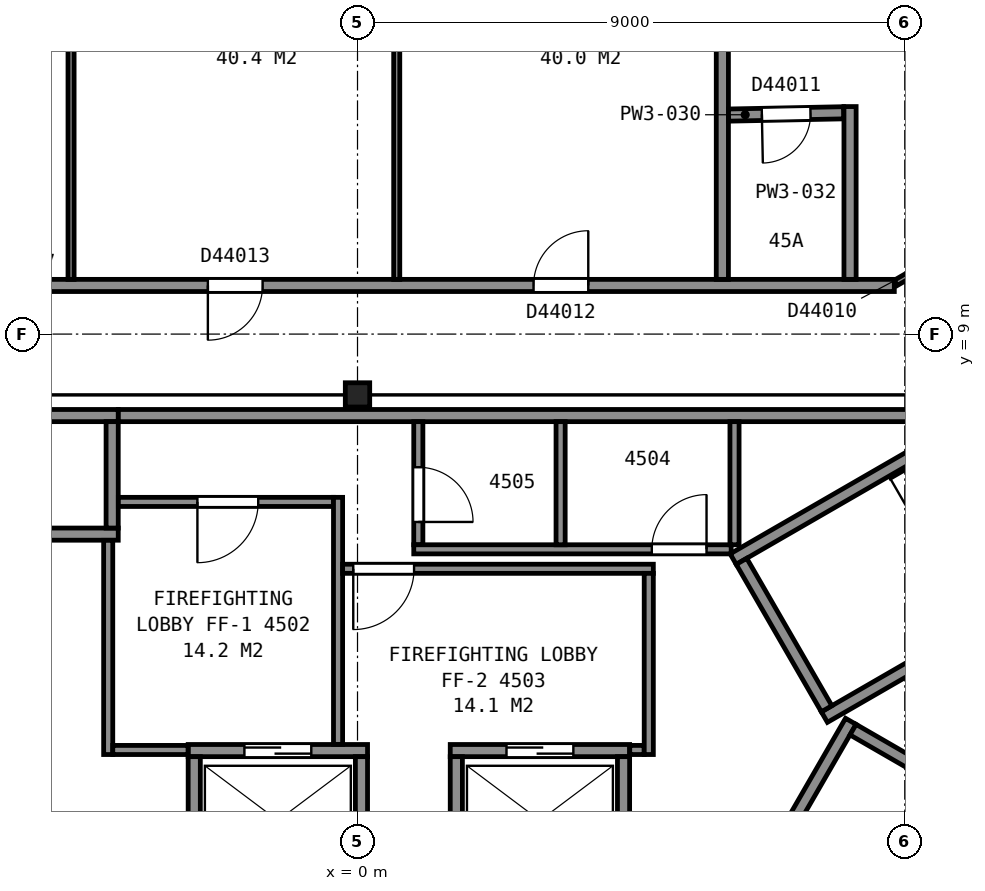
"""IFC4 building model, lengths in metres.
Left out: names, types, materials, properties, quantities, classifications, styles, units other than length and angle.
Written with IfcOpenShell. Run it as: python <this file> out.ifc"""

import sys

from ifc_helpers import new_model, si_unit, direction, frame, frame_2d, origin, origin_2d, place, context, subcontext, project, spatial, rectangle, i_section, extrude, element, fill, save


model = new_model("IFC4")
c1 = context("Model", 3, precision=1e-05, world=origin(), true_north=direction((0.0, 1.0)))
c2 = subcontext(c1, "Body", "Model", "MODEL_VIEW")
j1 = project(units=[si_unit("LENGTHUNIT", "METRE"), si_unit("PLANEANGLEUNIT", "RADIAN")], contexts=[c1])
p1 = place(None, origin())
s1 = spatial("IfcSite", under=j1, at=p1, CompositionType="ELEMENT")
p2 = place(p1, origin())
s2 = spatial("IfcBuilding", under=s1, at=p2, CompositionType="ELEMENT")
p3 = place(p2, frame((0.0, 0.0, 182.1)))
s3 = spatial("IfcBuildingStorey", under=s2, at=p3, CompositionType="ELEMENT", Elevation=182.1)
p4 = place(p3, frame((0.0, 8.0, 0.0), z_axis=(0.0, 0.0, 1.0), x_axis=(1.0, 0.0, 0.0)))
e1 = element("IfcColumn", 1, at=p4, inside=s3, PredefinedType="COLUMN", context=c2, shape_type="SweptSolid", body=[
    extrude(i_section(OverallWidth=0.401, OverallDepth=0.399, WebThickness=0.025, FlangeThickness=0.04, FilletRadius=0.015, at=origin_2d()), origin(), (0.0, 0.0, 1.0), 3.7),
])
for number, where, z_axis, x_axis in (
    (2, (6.178, 5.299, 0.0), (0.0, 0.0, 1.0), (0.866, 0.5, 0.0)),
    (3, (7.678, 2.701, 0.0), (0.0, 0.0, 1.0), (0.866, 0.5, 0.0)),
):
    element("IfcWall", number, at=place(p3, frame(where, z_axis=z_axis, x_axis=x_axis)), inside=s3, PredefinedType="PARTITIONING", context=c2, shape_type="SweptSolid", body=[
        extrude(rectangle(XDim=9.6, YDim=0.2, at=frame_2d((4.8, 0.0))), origin(), (0.0, 0.0, 1.0), 3.45),
    ])
p5 = place(p3, frame((7.715, 2.838, 0.0), z_axis=(0.0, 0.0, 1.0), x_axis=(-0.500049511043, 0.865996816683, 0.0)))
e4 = element("IfcWall", 4, at=p5, inside=s3, PredefinedType="PARTITIONING", context=c2, shape_type="SweptSolid", body=[
    extrude(rectangle(XDim=2.8, YDim=0.2, at=frame_2d((1.4, 0.0))), origin(), (0.0, 0.0, 1.0), 3.45),
])
p6 = place(p3, frame((-2.785, 2.15, 0.0), z_axis=(0.0, 0.0, 1.0), x_axis=(1.0, 0.0, 0.0)))
e5 = element("IfcWall", 5, at=p6, inside=s3, PredefinedType="PARTITIONING", context=c2, shape_type="SweptSolid", body=[
    extrude(rectangle(XDim=2.95, YDim=0.2, at=frame_2d((1.475, 0.0))), origin(), (0.0, 0.0, 1.0), 3.7),
])
p7 = place(p6, frame((0.925, 0.0, 0.0)))
e6 = element("IfcOpeningElement", 6, at=p7, cuts=e5, PredefinedType="OPENING", context=c2, shape_type="SweptSolid", body=[
    extrude(rectangle(XDim=1.1, YDim=2.1, at=frame_2d((0.55, 1.05))), frame((0.0, 0.11, 0.0), z_axis=(0.0, -1.0, 0.0), x_axis=(1.0, 0.0, 0.0)), (0.0, 0.0, 1.0), 0.22),
])
p8 = place(p3, frame((1.525, 2.15, 0.0), z_axis=(0.0, 0.0, 1.0), x_axis=(1.0, 0.0, 0.0)))
e7 = element("IfcWall", 7, at=p8, inside=s3, PredefinedType="PARTITIONING", context=c2, shape_type="SweptSolid", body=[
    extrude(rectangle(XDim=2.95, YDim=0.2, at=frame_2d((1.475, 0.0))), origin(), (0.0, 0.0, 1.0), 3.7),
])
p9 = place(p8, frame((0.925, 0.0, 0.0)))
e8 = element("IfcOpeningElement", 8, at=p9, cuts=e7, PredefinedType="OPENING", context=c2, shape_type="SweptSolid", body=[
    extrude(rectangle(XDim=1.1, YDim=2.1, at=frame_2d((0.55, 1.05))), frame((0.0, 0.11, 0.0), z_axis=(0.0, -1.0, 0.0), x_axis=(1.0, 0.0, 0.0)), (0.0, 0.0, 1.0), 0.22),
])
for number, where, z_axis, x_axis in (
    (9, (-6.285, 5.71, 0.0), (0.0, 0.0, 1.0), (1.0, 0.0, 0.0)),
    (10, (-6.285, 7.66, 0.0), (0.0, 0.0, 1.0), (1.0, 0.0, 0.0)),
):
    element("IfcWall", number, at=place(p3, frame(where, z_axis=z_axis, x_axis=x_axis)), inside=s3, PredefinedType="PARTITIONING", context=c2, shape_type="SweptSolid", body=[
        extrude(rectangle(XDim=2.35, YDim=0.2, at=frame_2d((1.175, 0.0))), origin(), (0.0, 0.0, 1.0), 3.7),
    ])
p10 = place(p3, frame((7.351, -2.587, 0.0), z_axis=(0.0, 0.0, 1.0), x_axis=(0.500002801628, 0.866023786258, 0.0)))
e11 = element("IfcWall", 11, at=p10, inside=s3, PredefinedType="PARTITIONING", context=c2, shape_type="SweptSolid", body=[
    extrude(rectangle(XDim=4.9, YDim=0.2, at=frame_2d((2.45, 0.0))), origin(), (0.0, 0.0, 1.0), 3.7),
])
p11 = place(p3, frame((5.663, -1.612, 0.0), z_axis=(0.0, 0.0, 1.0), x_axis=(0.49998122708, 0.866036242063, 0.0)))
e12 = element("IfcWall", 12, at=p11, inside=s3, PredefinedType="PARTITIONING", context=c2, shape_type="SweptSolid", body=[
    extrude(rectangle(XDim=4.9, YDim=0.2, at=frame_2d((2.45, 0.0))), origin(), (0.0, 0.0, 1.0), 3.7),
])
for number, where, z_axis, x_axis in (
    (13, (4.375, 0.1, 0.0), (0.0, 0.0, 1.0), (0.0, 1.0, 0.0)),
    (14, (1.625, 0.1, 0.0), (0.0, 0.0, 1.0), (0.0, 1.0, 0.0)),
    (15, (0.065, 0.1, 0.0), (0.0, 0.0, 1.0), (0.0, 1.0, 0.0)),
    (16, (-2.685, 0.1, 0.0), (0.0, 0.0, 1.0), (0.0, 1.0, 0.0)),
):
    element("IfcWall", number, at=place(p3, frame(where, z_axis=z_axis, x_axis=x_axis)), inside=s3, PredefinedType="PARTITIONING", context=c2, shape_type="SweptSolid", body=[
        extrude(rectangle(XDim=1.95, YDim=0.2, at=frame_2d((0.975, 0.0))), origin(), (0.0, 0.0, 1.0), 3.7),
    ])
p12 = place(p3, frame((-4.035, 5.81, 0.0), z_axis=(0.0, 0.0, 1.0), x_axis=(0.0, 1.0, 0.0)))
e17 = element("IfcWall", 17, at=p12, inside=s3, PredefinedType="PARTITIONING", context=c2, shape_type="SweptSolid", body=[
    extrude(rectangle(XDim=1.75, YDim=0.2, at=frame_2d((0.875, 0.0))), origin(), (0.0, 0.0, 1.0), 3.7),
])
p13 = place(p3, frame((9.665, 1.62, 0.0), z_axis=(0.0, 0.0, 1.0), x_axis=(-0.866002029911, 0.500040482552, 0.0)))
e18 = element("IfcWall", 18, at=p13, inside=s3, PredefinedType="PARTITIONING", context=c2, shape_type="SweptSolid", body=[
    extrude(rectangle(XDim=1.75, YDim=0.2, at=frame_2d((0.875, 0.0))), origin(), (0.0, 0.0, 1.0), 3.7),
])
p14 = place(p3, frame((-4.1, 2.085, 0.0), z_axis=(0.0, 0.0, 1.0), x_axis=(0.0, 1.0, 0.0)))
e19 = element("IfcWall", 19, at=p14, inside=s3, PredefinedType="PARTITIONING", context=c2, shape_type="SweptSolid", body=[
    extrude(rectangle(XDim=3.523, YDim=0.15, at=frame_2d((1.761, 0.0))), origin(), (0.0, 0.0, 1.0), 3.45),
])
p15 = place(p3, frame((-4.025, 2.16, 0.0), z_axis=(0.0, 0.0, 1.0), x_axis=(1.0, 0.0, 0.0)))
e20 = element("IfcWall", 20, at=p15, inside=s3, PredefinedType="PARTITIONING", context=c2, shape_type="SweptSolid", body=[
    extrude(rectangle(XDim=1.238, YDim=0.15, at=frame_2d((0.619, 0.0))), origin(), (0.0, 0.0, 1.0), 3.45),
])
p16 = place(p3, frame((-3.933, 6.24, 0.0), z_axis=(0.0, 0.0, 1.0), x_axis=(1.0, 0.0, 0.0)))
e21 = element("IfcWall", 21, at=p16, inside=s3, PredefinedType="PARTITIONING", context=c2, shape_type="SweptSolid", body=[
    extrude(rectangle(XDim=3.538, YDim=0.15, at=frame_2d((1.769, 0.0))), origin(), (0.0, 0.0, 1.0), 3.45),
])
p17 = place(p16, frame((1.3, 0.0, 0.0)))
e22 = element("IfcOpeningElement", 22, at=p17, cuts=e21, PredefinedType="OPENING", context=c2, shape_type="SweptSolid", body=[
    extrude(rectangle(XDim=1.0, YDim=2.1, at=frame_2d((0.5, 1.05))), frame((0.0, 0.085, 0.0), z_axis=(0.0, -1.0, 0.0), x_axis=(1.0, 0.0, 0.0)), (0.0, 0.0, 1.0), 0.17),
])
p18 = place(p3, frame((-3.933, 7.66, 0.0), z_axis=(0.0, 0.0, 1.0), x_axis=(1.0, 0.0, 0.0)))
e23 = element("IfcWall", 23, at=p18, inside=s3, PredefinedType="PARTITIONING", context=c2, shape_type="SweptSolid", body=[
    extrude(rectangle(XDim=13.841, YDim=0.2, at=frame_2d((6.92, 0.0))), origin(), (0.0, 0.0, 1.0), 3.45),
])
p19 = place(p3, frame((-0.32, 2.252, 0.0), z_axis=(0.0, 0.0, 1.0), x_axis=(0.0, 1.0, 0.0)))
e24 = element("IfcWall", 24, at=p19, inside=s3, PredefinedType="PARTITIONING", context=c2, shape_type="SweptSolid", body=[
    extrude(rectangle(XDim=4.063, YDim=0.15, at=frame_2d((2.031, 0.0))), origin(), (0.0, 0.0, 1.0), 3.45),
])
p20 = place(p3, frame((-0.245, 5.14, 0.0), z_axis=(0.0, 0.0, 1.0), x_axis=(1.0, 0.0, 0.0)))
e25 = element("IfcWall", 25, at=p20, inside=s3, PredefinedType="PARTITIONING", context=c2, shape_type="SweptSolid", body=[
    extrude(rectangle(XDim=5.11, YDim=0.15, at=frame_2d((2.555, 0.0))), origin(), (0.0, 0.0, 1.0), 3.45),
])
p21 = place(p20, frame((0.175, 0.0, 0.0)))
e26 = element("IfcOpeningElement", 26, at=p21, cuts=e25, PredefinedType="OPENING", context=c2, shape_type="SweptSolid", body=[
    extrude(rectangle(XDim=1.0, YDim=2.1, at=frame_2d((0.5, 1.05))), frame((0.0, 0.085, 0.0), z_axis=(0.0, -1.0, 0.0), x_axis=(1.0, 0.0, 0.0)), (0.0, 0.0, 1.0), 0.17),
])
p22 = place(p3, frame((1.0, 7.56, 0.0), z_axis=(0.0, 0.0, 1.0), x_axis=(0.0, -1.0, 0.0)))
e27 = element("IfcWall", 27, at=p22, inside=s3, PredefinedType="PARTITIONING", context=c2, shape_type="SweptSolid", body=[
    extrude(rectangle(XDim=2.025, YDim=0.15, at=frame_2d((1.013, 0.0))), origin(), (0.0, 0.0, 1.0), 3.45),
])
p23 = place(p22, frame((0.75, 0.0, 0.0)))
e28 = element("IfcOpeningElement", 28, at=p23, cuts=e27, PredefinedType="OPENING", context=c2, shape_type="SweptSolid", body=[
    extrude(rectangle(XDim=0.9, YDim=2.1, at=frame_2d((0.45, 1.05))), frame((0.0, 0.085, 0.0), z_axis=(0.0, -1.0, 0.0), x_axis=(1.0, 0.0, 0.0)), (0.0, 0.0, 1.0), 0.17),
])
p24 = place(p3, frame((0.925, 5.46, 0.0), z_axis=(0.0, 0.0, 1.0), x_axis=(1.0, 0.0, 0.0)))
e29 = element("IfcWall", 29, at=p24, inside=s3, PredefinedType="PARTITIONING", context=c2, shape_type="SweptSolid", body=[
    extrude(rectangle(XDim=5.22, YDim=0.15, at=frame_2d((2.61, 0.0))), origin(), (0.0, 0.0, 1.0), 3.45),
])
p25 = place(p24, frame((3.915, 0.0, 0.0)))
e30 = element("IfcOpeningElement", 30, at=p25, cuts=e29, PredefinedType="OPENING", context=c2, shape_type="SweptSolid", body=[
    extrude(rectangle(XDim=0.9, YDim=2.1, at=frame_2d((0.45, 1.05))), frame((0.0, 0.085, 0.0), z_axis=(0.0, -1.0, 0.0), x_axis=(1.0, 0.0, 0.0)), (0.0, 0.0, 1.0), 0.17),
])
p26 = place(p3, frame((3.34, 5.535, 0.0), z_axis=(0.0, 0.0, 1.0), x_axis=(0.0, 1.0, 0.0)))
e31 = element("IfcWall", 31, at=p26, inside=s3, PredefinedType="PARTITIONING", context=c2, shape_type="SweptSolid", body=[
    extrude(rectangle(XDim=2.025, YDim=0.15, at=frame_2d((1.013, 0.0))), origin(), (0.0, 0.0, 1.0), 3.45),
])
p27 = place(p3, frame((4.477, 2.16, 0.0), z_axis=(0.0, 0.0, 1.0), x_axis=(1.0, 0.0, 0.0)))
e32 = element("IfcWall", 32, at=p27, inside=s3, PredefinedType="PARTITIONING", context=c2, shape_type="SweptSolid", body=[
    extrude(rectangle(XDim=0.238, YDim=0.15, at=frame_2d((0.119, 0.0))), origin(), (0.0, 0.0, 1.0), 3.45),
])
p28 = place(p3, frame((4.79, 2.085, 0.0), z_axis=(0.0, 0.0, 1.0), x_axis=(0.0, 1.0, 0.0)))
e33 = element("IfcWall", 33, at=p28, inside=s3, PredefinedType="PARTITIONING", context=c2, shape_type="SweptSolid", body=[
    extrude(rectangle(XDim=2.98, YDim=0.15, at=frame_2d((1.49, 0.0))), origin(), (0.0, 0.0, 1.0), 3.45),
])
p29 = place(p3, frame((6.2, 5.535, 0.0), z_axis=(0.0, 0.0, 1.0), x_axis=(0.0, 1.0, 0.0)))
e34 = element("IfcWall", 34, at=p29, inside=s3, PredefinedType="PARTITIONING", context=c2, shape_type="SweptSolid", body=[
    extrude(rectangle(XDim=2.025, YDim=0.15, at=frame_2d((1.013, 0.0))), origin(), (0.0, 0.0, 1.0), 3.45),
])
p30 = place(p3, frame((-4.075, -12.545, 0.0), z_axis=(0.0, 0.0, 1.0), x_axis=(-0.499997769292, 0.86602669168, 0.0)))
e35 = element("IfcWall", 35, at=p30, inside=s3, PredefinedType="PARTITIONING", context=c2, shape_type="SweptSolid", body=[
    extrude(rectangle(XDim=17.706, YDim=0.2, at=frame_2d((8.853, 0.0))), origin(), (0.0, 0.0, 1.0), 2.713),
])
p31 = place(p30, frame((14.46, 0.0, 0.0)))
e36 = element("IfcOpeningElement", 36, at=p31, cuts=e35, PredefinedType="OPENING", context=c2, shape_type="SweptSolid", body=[
    extrude(rectangle(XDim=0.9, YDim=2.1, at=frame_2d((0.45, 1.05))), frame((0.0, 0.11, 0.0), z_axis=(0.0, -1.0, 0.0), x_axis=(1.0, 0.0, 0.0)), (0.0, 0.0, 1.0), 0.22),
])
p32 = place(p30, frame((10.896, 0.0, 0.0)))
e37 = element("IfcOpeningElement", 37, at=p32, cuts=e35, PredefinedType="OPENING", context=c2, shape_type="SweptSolid", body=[
    extrude(rectangle(XDim=0.9, YDim=2.1, at=frame_2d((0.45, 1.05))), frame((0.0, 0.11, 0.0), z_axis=(0.0, -1.0, 0.0), x_axis=(1.0, 0.0, 0.0)), (0.0, 0.0, 1.0), 0.22),
])
p33 = place(p30, frame((6.068, 0.0, 0.0)))
e38 = element("IfcOpeningElement", 38, at=p33, cuts=e35, PredefinedType="OPENING", context=c2, shape_type="SweptSolid", body=[
    extrude(rectangle(XDim=0.9, YDim=2.1, at=frame_2d((0.45, 1.05))), frame((0.0, 0.11, 0.0), z_axis=(0.0, -1.0, 0.0), x_axis=(1.0, 0.0, 0.0)), (0.0, 0.0, 1.0), 0.22),
])
p34 = place(p3, frame((-8.828, 9.8, 0.0), z_axis=(0.0, 0.0, 1.0), x_axis=(1.0, 0.0, 0.0)))
e39 = element("IfcWall", 39, at=p34, inside=s3, PredefinedType="PARTITIONING", context=c2, shape_type="SweptSolid", body=[
    extrude(rectangle(XDim=17.656, YDim=0.2, at=frame_2d((8.828, 0.0))), origin(), (0.0, 0.0, 1.0), 2.713),
])
p35 = place(p34, frame((11.723, 0.0, 0.0)))
e40 = element("IfcOpeningElement", 40, at=p35, cuts=e39, PredefinedType="OPENING", context=c2, shape_type="SweptSolid", body=[
    extrude(rectangle(XDim=0.9, YDim=2.1, at=frame_2d((0.45, 1.05))), frame((0.0, 0.11, 0.0), z_axis=(0.0, -1.0, 0.0), x_axis=(1.0, 0.0, 0.0)), (0.0, 0.0, 1.0), 0.22),
])
p36 = place(p34, frame((6.367, 0.0, 0.0)))
e41 = element("IfcOpeningElement", 41, at=p36, cuts=e39, PredefinedType="OPENING", context=c2, shape_type="SweptSolid", body=[
    extrude(rectangle(XDim=0.9, YDim=2.1, at=frame_2d((0.45, 1.05))), frame((0.0, 0.11, 0.0), z_axis=(0.0, -1.0, 0.0), x_axis=(1.0, 0.0, 0.0)), (0.0, 0.0, 1.0), 0.22),
])
for number, where, z_axis, x_axis in (
    (42, (-4.711, 9.9, 0.0), (0.0, 0.0, 1.0), (0.0, 1.0, 0.0)),
    (43, (0.645, 9.9, 0.0), (0.0, 0.0, 1.0), (0.0, 1.0, 0.0)),
):
    element("IfcWall", number, at=place(p3, frame(where, z_axis=z_axis, x_axis=x_axis)), inside=s3, PredefinedType="PARTITIONING", context=c2, shape_type="SweptSolid", body=[
        extrude(rectangle(XDim=7.735, YDim=0.1, at=frame_2d((3.868, 0.0))), origin(), (0.0, 0.0, 1.0), 2.713),
    ])
p37 = place(p3, frame((12.903, 2.745, 0.0), z_axis=(0.0, 0.0, 1.0), x_axis=(-0.499997333799, -0.866026943111, 0.0)))
e44 = element("IfcWall", 44, at=p37, inside=s3, PredefinedType="PARTITIONING", context=c2, shape_type="SweptSolid", body=[
    extrude(rectangle(XDim=17.606, YDim=0.1, at=frame_2d((8.803, 0.0))), origin(), (0.0, 0.0, 1.0), 2.713),
])
p38 = place(p37, frame((15.756, 0.0, 0.0)))
e45 = element("IfcOpeningElement", 45, at=p38, cuts=e44, PredefinedType="OPENING", context=c2, shape_type="SweptSolid", body=[
    extrude(rectangle(XDim=0.9, YDim=2.1, at=frame_2d((0.45, 1.05))), frame((0.0, 0.06, 0.0), z_axis=(0.0, -1.0, 0.0), x_axis=(1.0, 0.0, 0.0)), (0.0, 0.0, 1.0), 0.12),
])
p39 = place(p37, frame((11.679, 0.0, 0.0)))
e46 = element("IfcOpeningElement", 46, at=p39, cuts=e44, PredefinedType="OPENING", context=c2, shape_type="SweptSolid", body=[
    extrude(rectangle(XDim=0.9, YDim=2.1, at=frame_2d((0.45, 1.05))), frame((0.0, 0.06, 0.0), z_axis=(0.0, -1.0, 0.0), x_axis=(1.0, 0.0, 0.0)), (0.0, 0.0, 1.0), 0.12),
])
p40 = place(p37, frame((6.324, 0.0, 0.0)))
e47 = element("IfcOpeningElement", 47, at=p40, cuts=e44, PredefinedType="OPENING", context=c2, shape_type="SweptSolid", body=[
    extrude(rectangle(XDim=0.9, YDim=2.1, at=frame_2d((0.45, 1.05))), frame((0.0, 0.06, 0.0), z_axis=(0.0, -1.0, 0.0), x_axis=(1.0, 0.0, 0.0)), (0.0, 0.0, 1.0), 0.12),
])
p41 = place(p3, frame((6.0, 9.9, 0.0), z_axis=(0.0, 0.0, 1.0), x_axis=(0.0, 1.0, 0.0)))
e48 = element("IfcWall", 48, at=p41, inside=s3, PredefinedType="PARTITIONING", context=c2, shape_type="SweptSolid", body=[
    extrude(rectangle(XDim=7.735, YDim=0.2, at=frame_2d((3.868, 0.0))), origin(), (0.0, 0.0, 1.0), 2.713),
])
p42 = place(p3, frame((7.995, 12.64, 0.0), z_axis=(0.0, 0.0, 1.0), x_axis=(-0.999800266148, -0.019985690128, 0.0)))
e49 = element("IfcWall", 49, at=p42, inside=s3, PredefinedType="PARTITIONING", context=c2, shape_type="SweptSolid", body=[
    extrude(rectangle(XDim=1.894, YDim=0.2, at=frame_2d((0.947, 0.0))), origin(), (0.0, 0.0, 1.0), 2.713),
])
p43 = place(p42, frame((0.545, 0.0, 0.0)))
e50 = element("IfcOpeningElement", 50, at=p43, cuts=e49, PredefinedType="OPENING", context=c2, shape_type="SweptSolid", body=[
    extrude(rectangle(XDim=0.8, YDim=2.1, at=frame_2d((0.4, 1.05))), frame((0.0, 0.11, 0.0), z_axis=(0.0, -1.0, 0.0), x_axis=(1.0, 0.0, 0.0)), (0.0, 0.0, 1.0), 0.22),
])
p44 = place(p3, frame((8.1, 9.9, 0.0), z_axis=(0.0, 0.0, 1.0), x_axis=(0.0, 1.0, 0.0)))
e51 = element("IfcWall", 51, at=p44, inside=s3, PredefinedType="PARTITIONING", context=c2, shape_type="SweptSolid", body=[
    extrude(rectangle(XDim=2.842, YDim=0.2, at=frame_2d((1.421, 0.0))), origin(), (0.0, 0.0, 1.0), 2.713),
])
p45 = place(p3, frame((8.852, 9.843, 0.0), z_axis=(0.0, 0.0, 1.0), x_axis=(0.866088973199, 0.499889878377, 0.0)))
e52 = element("IfcWall", 52, at=p45, inside=s3, PredefinedType="PARTITIONING", context=c2, shape_type="SweptSolid", body=[
    extrude(rectangle(XDim=8.163, YDim=0.1, at=frame_2d((4.082, 0.0))), origin(), (0.0, 0.0, 1.0), 2.713),
])
p46 = place(p45, frame((4.583, 0.0, 0.0)))
e53 = element("IfcOpeningElement", 53, at=p46, cuts=e52, PredefinedType="OPENING", context=c2, shape_type="SweptSolid", body=[
    extrude(rectangle(XDim=0.9, YDim=2.1, at=frame_2d((0.45, 1.05))), frame((0.0, 0.06, 0.0), z_axis=(0.0, -1.0, 0.0), x_axis=(1.0, 0.0, 0.0)), (0.0, 0.0, 1.0), 0.12),
])
p47 = place(p45, frame((0.715, 0.0, 0.0)))
e54 = element("IfcOpeningElement", 54, at=p47, cuts=e52, PredefinedType="OPENING", context=c2, shape_type="SweptSolid", body=[
    extrude(rectangle(XDim=0.9, YDim=2.1, at=frame_2d((0.45, 1.05))), frame((0.0, 0.06, 0.0), z_axis=(0.0, -1.0, 0.0), x_axis=(1.0, 0.0, 0.0)), (0.0, 0.0, 1.0), 0.12),
])
p48 = place(p7, origin())
e55 = element("IfcDoor", 55, at=p48, inside=s3, OperationType="SLIDING_TO_LEFT", PredefinedType="DOOR", context=c2, shape_type="SweptSolid", body=[
    extrude(rectangle(XDim=1.1, YDim=2.1, at=frame_2d((0.55, 1.05))), frame((0.0, 0.025, 0.0), z_axis=(0.0, -1.0, 0.0), x_axis=(1.0, 0.0, 0.0)), (0.0, 0.0, 1.0), 0.05),
])
fill(e6, e55)
p49 = place(p9, origin())
e56 = element("IfcDoor", 56, at=p49, inside=s3, OperationType="SLIDING_TO_RIGHT", PredefinedType="DOOR", context=c2, shape_type="SweptSolid", body=[
    extrude(rectangle(XDim=1.1, YDim=2.1, at=frame_2d((0.55, 1.05))), frame((0.0, 0.025, 0.0), z_axis=(0.0, -1.0, 0.0), x_axis=(1.0, 0.0, 0.0)), (0.0, 0.0, 1.0), 0.05),
])
fill(e8, e56)
p50 = place(p17, origin())
e57 = element("IfcDoor", 57, at=p50, inside=s3, OperationType="SINGLE_SWING_LEFT", PredefinedType="DOOR", context=c2, shape_type="SweptSolid", body=[
    extrude(rectangle(XDim=1.0, YDim=2.1, at=frame_2d((0.5, 1.05))), frame((0.0, 0.025, 0.0), z_axis=(0.0, -1.0, 0.0), x_axis=(1.0, 0.0, 0.0)), (0.0, 0.0, 1.0), 0.05),
])
fill(e22, e57)
p51 = place(p21, origin())
e58 = element("IfcDoor", 58, at=p51, inside=s3, OperationType="SINGLE_SWING_LEFT", PredefinedType="DOOR", context=c2, shape_type="SweptSolid", body=[
    extrude(rectangle(XDim=1.0, YDim=2.1, at=frame_2d((0.5, 1.05))), frame((0.0, 0.025, 0.0), z_axis=(0.0, -1.0, 0.0), x_axis=(1.0, 0.0, 0.0)), (0.0, 0.0, 1.0), 0.05),
])
fill(e26, e58)
p52 = place(p23, origin())
e59 = element("IfcDoor", 59, at=p52, inside=s3, OperationType="SINGLE_SWING_RIGHT", PredefinedType="DOOR", context=c2, shape_type="SweptSolid", body=[
    extrude(rectangle(XDim=0.9, YDim=2.1, at=frame_2d((0.45, 1.05))), frame((0.0, 0.025, 0.0), z_axis=(0.0, -1.0, 0.0), x_axis=(1.0, 0.0, 0.0)), (0.0, 0.0, 1.0), 0.05),
])
fill(e28, e59)
p53 = place(p25, origin())
e60 = element("IfcDoor", 60, at=p53, inside=s3, OperationType="SINGLE_SWING_RIGHT", PredefinedType="DOOR", context=c2, shape_type="SweptSolid", body=[
    extrude(rectangle(XDim=0.9, YDim=2.1, at=frame_2d((0.45, 1.05))), frame((0.0, 0.025, 0.0), z_axis=(0.0, -1.0, 0.0), x_axis=(1.0, 0.0, 0.0)), (0.0, 0.0, 1.0), 0.05),
])
fill(e30, e60)
p54 = place(p35, origin())
e61 = element("IfcDoor", 61, at=p54, inside=s3, OperationType="SINGLE_SWING_RIGHT", PredefinedType="DOOR", context=c2, shape_type="SweptSolid", body=[
    extrude(rectangle(XDim=0.9, YDim=2.1, at=frame_2d((0.45, 1.05))), frame((0.0, 0.025, 0.0), z_axis=(0.0, -1.0, 0.0), x_axis=(1.0, 0.0, 0.0)), (0.0, 0.0, 1.0), 0.05),
])
fill(e40, e61)
p55 = place(p36, origin())
e62 = element("IfcDoor", 62, at=p55, inside=s3, OperationType="SINGLE_SWING_LEFT", PredefinedType="DOOR", context=c2, shape_type="SweptSolid", body=[
    extrude(rectangle(XDim=0.9, YDim=2.1, at=frame_2d((0.45, 1.05))), frame((0.0, 0.025, 0.0), z_axis=(0.0, -1.0, 0.0), x_axis=(1.0, 0.0, 0.0)), (0.0, 0.0, 1.0), 0.05),
])
fill(e41, e62)
p56 = place(p43, origin())
e63 = element("IfcDoor", 63, at=p56, inside=s3, OperationType="SINGLE_SWING_RIGHT", PredefinedType="DOOR", context=c2, shape_type="SweptSolid", body=[
    extrude(rectangle(XDim=0.8, YDim=2.1, at=frame_2d((0.4, 1.05))), frame((0.0, 0.025, 0.0), z_axis=(0.0, -1.0, 0.0), x_axis=(1.0, 0.0, 0.0)), (0.0, 0.0, 1.0), 0.05),
])
fill(e50, e63)
save(model, sys.argv[1])
